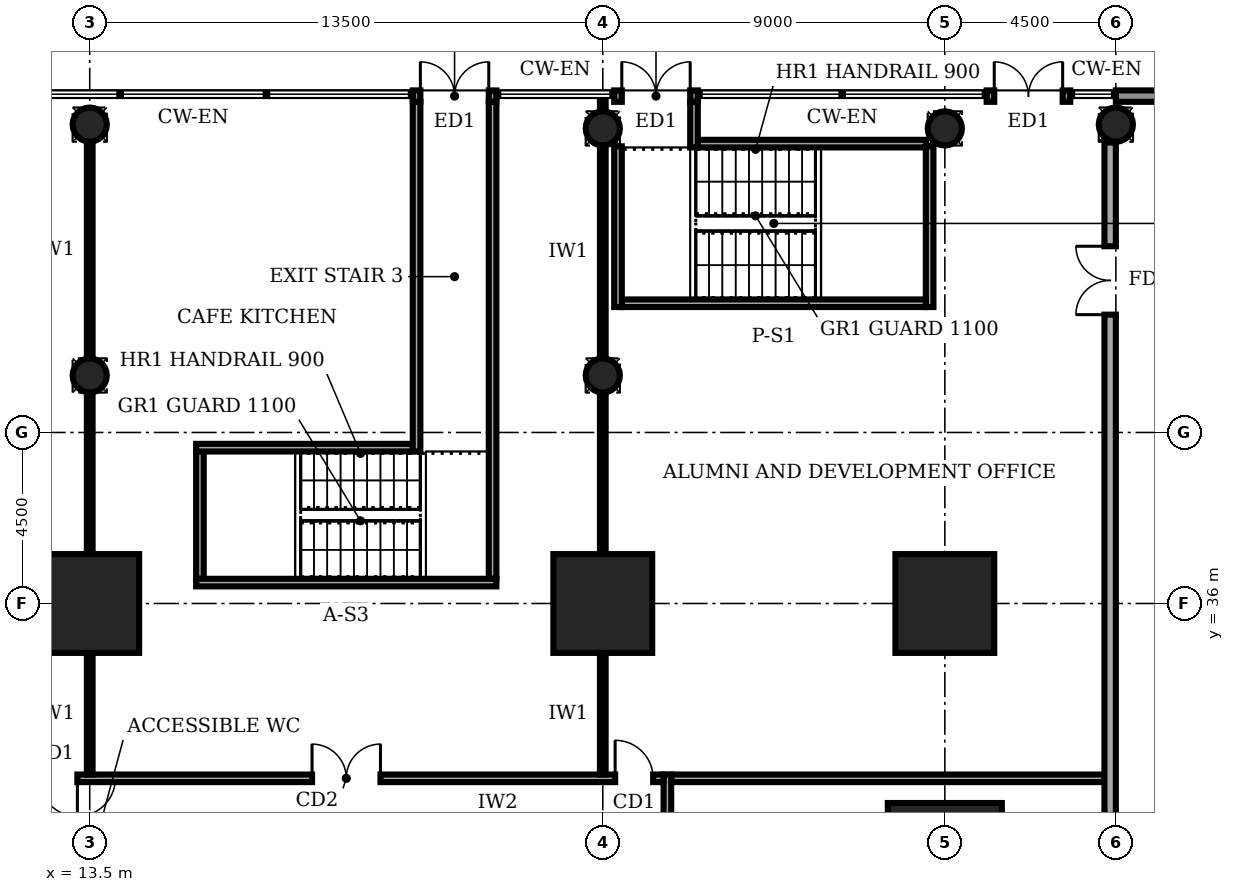
"""IFC4 building model, lengths in metres.
Left out: names, types, materials, properties, quantities, classifications, styles, units other than length and angle.
Written with IfcOpenShell. Run it as: python <this file> out.ifc"""

import sys

from ifc_helpers import new_model, si_unit, direction, frame, frame_2d, origin, origin_2d, place, context, subcontext, project, spatial, rectangle, circle, extrude, element, fill, save


model = new_model("IFC4")
c1 = context("Model", 3, precision=1e-05, world=origin(), true_north=direction((0.0, 1.0)))
c2 = subcontext(c1, "Body", "Model", "MODEL_VIEW")
j1 = project(units=[si_unit("LENGTHUNIT", "METRE"), si_unit("PLANEANGLEUNIT", "RADIAN")], contexts=[c1])
p1 = place(None, origin())
s1 = spatial("IfcSite", under=j1, at=p1, CompositionType="ELEMENT")
p2 = place(p1, origin())
s2 = spatial("IfcBuilding", under=s1, at=p2, CompositionType="ELEMENT")
p3 = place(p2, origin())
s3 = spatial("IfcBuildingStorey", under=s2, at=p3, CompositionType="ELEMENT", Elevation=0.0)
p4 = place(p3, frame((36.0, 29.25, -0.4), z_axis=(0.0, 0.0, 1.0), x_axis=(1.0, 0.0, 0.0)))
e1 = element("IfcColumn", 1, at=p4, inside=s3, PredefinedType="COLUMN", context=c2, shape_type="SweptSolid", body=[
    extrude(rectangle(XDim=3.0, YDim=3.0, at=origin_2d()), origin(), (0.0, 0.0, 1.0), 6.4),
])
for number, where, z_axis, x_axis in (
    (2, (13.5, 36.0, -0.4), (0.0, 0.0, 1.0), (1.0, 0.0, 0.0)),
    (3, (27.0, 36.0, -0.4), (0.0, 0.0, 1.0), (1.0, 0.0, 0.0)),
    (4, (36.0, 36.0, -0.4), (0.0, 0.0, 1.0), (1.0, 0.0, 0.0)),
):
    element("IfcColumn", number, at=place(p3, frame(where, z_axis=z_axis, x_axis=x_axis)), inside=s3, PredefinedType="COLUMN", context=c2, shape_type="SweptSolid", body=[
        extrude(rectangle(XDim=2.6, YDim=2.6, at=origin_2d()), origin(), (0.0, 0.0, 1.0), 6.4),
    ])
for number, where, z_axis, x_axis in (
    (5, (13.5, 42.0, -0.4), (0.0, 0.0, 1.0), (1.0, 0.0, 0.0)),
    (6, (27.0, 42.0, -0.4), (0.0, 0.0, 1.0), (1.0, 0.0, 0.0)),
    (7, (13.5, 48.6, -0.4), (0.0, 0.0, 1.0), (1.0, 0.0, 0.0)),
    (8, (27.0, 48.5, -0.4), (0.0, 0.0, 1.0), (1.0, 0.0, 0.0)),
    (9, (36.0, 48.5, -0.4), (0.0, 0.0, 1.0), (1.0, 0.0, 0.0)),
    (10, (40.5, 48.6, -0.4), (0.0, 0.0, 1.0), (1.0, 0.0, 0.0)),
):
    element("IfcColumn", number, at=place(p3, frame(where, z_axis=z_axis, x_axis=x_axis)), inside=s3, PredefinedType="COLUMN", context=c2, shape_type="SweptSolid", body=[
        extrude(circle(Radius=0.45, at=origin_2d()), origin(), (0.0, 0.0, 1.0), 6.4),
    ])
p5 = place(p3, frame((24.2, 49.35, 0.0), z_axis=(0.0, 0.0, 1.0), x_axis=(-1.0, 0.0, 0.0)))
e11 = element("IfcWall", 11, at=p5, inside=s3, PredefinedType="STANDARD", context=c2, shape_type="SweptSolid", body=[
    extrude(rectangle(XDim=2.2, YDim=0.3, at=frame_2d((1.1, 0.0))), origin(), (0.0, 0.0, 1.0), 5.7),
])
p6 = place(p5, frame((0.2, 0.0, 0.0)))
e12 = element("IfcOpeningElement", 12, at=p6, cuts=e11, PredefinedType="OPENING", context=c2, shape_type="SweptSolid", body=[
    extrude(rectangle(XDim=1.8, YDim=2.4, at=frame_2d((0.9, 1.2))), frame((0.0, 0.16, 0.0), z_axis=(0.0, -1.0, 0.0), x_axis=(1.0, 0.0, 0.0)), (0.0, 0.0, 1.0), 0.32),
])
p7 = place(p3, frame((29.5, 49.35, 0.0), z_axis=(0.0, 0.0, 1.0), x_axis=(-1.0, 0.0, 0.0)))
e13 = element("IfcWall", 13, at=p7, inside=s3, PredefinedType="STANDARD", context=c2, shape_type="SweptSolid", body=[
    extrude(rectangle(XDim=2.2, YDim=0.3, at=frame_2d((1.1, 0.0))), origin(), (0.0, 0.0, 1.0), 5.7),
])
p8 = place(p7, frame((0.2, 0.0, 0.0)))
e14 = element("IfcOpeningElement", 14, at=p8, cuts=e13, PredefinedType="OPENING", context=c2, shape_type="SweptSolid", body=[
    extrude(rectangle(XDim=1.8, YDim=2.4, at=frame_2d((0.9, 1.2))), frame((0.0, 0.16, 0.0), z_axis=(0.0, -1.0, 0.0), x_axis=(1.0, 0.0, 0.0)), (0.0, 0.0, 1.0), 0.32),
])
p9 = place(p3, frame((39.3, 49.35, 0.0), z_axis=(0.0, 0.0, 1.0), x_axis=(-1.0, 0.0, 0.0)))
e15 = element("IfcWall", 15, at=p9, inside=s3, PredefinedType="STANDARD", context=c2, shape_type="SweptSolid", body=[
    extrude(rectangle(XDim=2.2, YDim=0.3, at=frame_2d((1.1, 0.0))), origin(), (0.0, 0.0, 1.0), 5.7),
])
p10 = place(p9, frame((0.2, 0.0, 0.0)))
e16 = element("IfcOpeningElement", 16, at=p10, cuts=e15, PredefinedType="OPENING", context=c2, shape_type="SweptSolid", body=[
    extrude(rectangle(XDim=1.8, YDim=2.4, at=frame_2d((0.9, 1.2))), frame((0.0, 0.16, 0.0), z_axis=(0.0, -1.0, 0.0), x_axis=(1.0, 0.0, 0.0)), (0.0, 0.0, 1.0), 0.32),
])
p11 = place(p3, frame((63.0, 49.35, 0.0), z_axis=(0.0, 0.0, 1.0), x_axis=(-1.0, 0.0, 0.0)))
e17 = element("IfcWall", 17, at=p11, inside=s3, PredefinedType="STANDARD", context=c2, shape_type="SweptSolid", body=[
    extrude(rectangle(XDim=22.5, YDim=0.3, at=frame_2d((11.25, 0.0))), origin(), (0.0, 0.0, 1.0), 5.7),
])
p12 = place(p11, frame((17.1, 0.0, 0.0)))
e18 = element("IfcOpeningElement", 18, at=p12, cuts=e17, PredefinedType="OPENING", context=c2, shape_type="SweptSolid", body=[
    extrude(rectangle(XDim=1.8, YDim=2.4, at=frame_2d((0.9, 1.2))), frame((0.0, 0.16, 0.0), z_axis=(0.0, -1.0, 0.0), x_axis=(1.0, 0.0, 0.0)), (0.0, 0.0, 1.0), 0.32),
])
p13 = place(p11, frame((12.6, 0.0, 0.0)))
e19 = element("IfcOpeningElement", 19, at=p13, cuts=e17, PredefinedType="OPENING", context=c2, shape_type="SweptSolid", body=[
    extrude(rectangle(XDim=1.8, YDim=2.4, at=frame_2d((0.9, 1.2))), frame((0.0, 0.16, 0.0), z_axis=(0.0, -1.0, 0.0), x_axis=(1.0, 0.0, 0.0)), (0.0, 0.0, 1.0), 0.32),
])
p14 = place(p11, frame((2.5, 0.0, 0.0)))
e20 = element("IfcOpeningElement", 20, at=p14, cuts=e17, PredefinedType="OPENING", context=c2, shape_type="SweptSolid", body=[
    extrude(rectangle(XDim=1.8, YDim=2.4, at=frame_2d((0.9, 1.2))), frame((0.0, 0.16, 0.0), z_axis=(0.0, -1.0, 0.0), x_axis=(1.0, 0.0, 0.0)), (0.0, 0.0, 1.0), 0.32),
])
p15 = place(p3, frame((28.7, 9.2, 0.0), z_axis=(0.0, 0.0, 1.0), x_axis=(0.0, 1.0, 0.0)))
e21 = element("IfcWall", 21, at=p15, inside=s3, PredefinedType="SOLIDWALL", context=c2, shape_type="SweptSolid", body=[
    extrude(rectangle(XDim=22.3, YDim=0.2, at=frame_2d((11.15, 0.0))), origin(), (0.0, 0.0, 1.0), 5.7),
])
p16 = place(p15, frame((1.55, 0.0, 0.0)))
e22 = element("IfcOpeningElement", 22, at=p16, cuts=e21, PredefinedType="OPENING", context=c2, shape_type="SweptSolid", body=[
    extrude(rectangle(XDim=1.0, YDim=2.1, at=frame_2d((0.5, 1.05))), frame((0.0, 0.11, 0.0), z_axis=(0.0, -1.0, 0.0), x_axis=(1.0, 0.0, 0.0)), (0.0, 0.0, 1.0), 0.22),
])
p17 = place(p15, frame((10.15, 0.0, 0.0)))
e23 = element("IfcOpeningElement", 23, at=p17, cuts=e21, PredefinedType="OPENING", context=c2, shape_type="SweptSolid", body=[
    extrude(rectangle(XDim=1.8, YDim=2.1, at=frame_2d((0.9, 1.05))), frame((0.0, 0.11, 0.0), z_axis=(0.0, -1.0, 0.0), x_axis=(1.0, 0.0, 0.0)), (0.0, 0.0, 1.0), 0.22),
])
p18 = place(p15, frame((19.55, 0.0, 0.0)))
e24 = element("IfcOpeningElement", 24, at=p18, cuts=e21, PredefinedType="OPENING", context=c2, shape_type="SweptSolid", body=[
    extrude(rectangle(XDim=1.0, YDim=2.1, at=frame_2d((0.5, 1.05))), frame((0.0, 0.11, 0.0), z_axis=(0.0, -1.0, 0.0), x_axis=(1.0, 0.0, 0.0)), (0.0, 0.0, 1.0), 0.22),
])
p19 = place(p3, frame((28.6, 31.4, 0.0), z_axis=(0.0, 0.0, 1.0), x_axis=(-1.0, 0.0, 0.0)))
e25 = element("IfcWall", 25, at=p19, inside=s3, PredefinedType="SOLIDWALL", context=c2, shape_type="SweptSolid", body=[
    extrude(rectangle(XDim=16.9, YDim=0.2, at=frame_2d((8.45, 0.0))), origin(), (0.0, 0.0, 1.0), 5.7),
])
p20 = place(p19, frame((15.425, 0.0, 0.0)))
e26 = element("IfcOpeningElement", 26, at=p20, cuts=e25, PredefinedType="OPENING", context=c2, shape_type="SweptSolid", body=[
    extrude(rectangle(XDim=1.0, YDim=2.1, at=frame_2d((0.5, 1.05))), frame((0.0, 0.11, 0.0), z_axis=(0.0, -1.0, 0.0), x_axis=(1.0, 0.0, 0.0)), (0.0, 0.0, 1.0), 0.22),
])
p21 = place(p19, frame((7.45, 0.0, 0.0)))
e27 = element("IfcOpeningElement", 27, at=p21, cuts=e25, PredefinedType="OPENING", context=c2, shape_type="SweptSolid", body=[
    extrude(rectangle(XDim=1.8, YDim=2.1, at=frame_2d((0.9, 1.05))), frame((0.0, 0.11, 0.0), z_axis=(0.0, -1.0, 0.0), x_axis=(1.0, 0.0, 0.0)), (0.0, 0.0, 1.0), 0.22),
])
p22 = place(p19, frame((0.275, 0.0, 0.0)))
e28 = element("IfcOpeningElement", 28, at=p22, cuts=e25, PredefinedType="OPENING", context=c2, shape_type="SweptSolid", body=[
    extrude(rectangle(XDim=1.0, YDim=2.1, at=frame_2d((0.5, 1.05))), frame((0.0, 0.11, 0.0), z_axis=(0.0, -1.0, 0.0), x_axis=(1.0, 0.0, 0.0)), (0.0, 0.0, 1.0), 0.22),
])
p23 = place(p3, frame((28.8, 31.4, 0.0), z_axis=(0.0, 0.0, 1.0), x_axis=(1.0, 0.0, 0.0)))
e29 = element("IfcWall", 29, at=p23, inside=s3, PredefinedType="SOLIDWALL", context=c2, shape_type="SweptSolid", body=[
    extrude(rectangle(XDim=11.4, YDim=0.2, at=frame_2d((5.7, 0.0))), origin(), (0.0, 0.0, 1.0), 5.7),
])
p24 = place(p3, frame((13.5, 31.5, 0.0), z_axis=(0.0, 0.0, 1.0), x_axis=(0.0, 1.0, 0.0)))
e30 = element("IfcWall", 30, at=p24, inside=s3, PredefinedType="PARTITIONING", context=c2, shape_type="SweptSolid", body=[
    extrude(rectangle(XDim=3.18, YDim=0.15, at=frame_2d((1.59, 0.0))), origin(), (0.0, 0.0, 1.0), 4.8),
])
p25 = place(p3, frame((13.5, 37.32, 0.0), z_axis=(0.0, 0.0, 1.0), x_axis=(0.0, 1.0, 0.0)))
e31 = element("IfcWall", 31, at=p25, inside=s3, PredefinedType="PARTITIONING", context=c2, shape_type="SweptSolid", body=[
    extrude(rectangle(XDim=4.21, YDim=0.15, at=frame_2d((2.105, 0.0))), origin(), (0.0, 0.0, 1.0), 4.7),
])
p26 = place(p3, frame((13.5, 42.47, 0.0), z_axis=(0.0, 0.0, 1.0), x_axis=(0.0, 1.0, 0.0)))
e32 = element("IfcWall", 32, at=p26, inside=s3, PredefinedType="PARTITIONING", context=c2, shape_type="SweptSolid", body=[
    extrude(rectangle(XDim=5.66, YDim=0.15, at=frame_2d((2.83, 0.0))), origin(), (0.0, 0.0, 1.0), 4.7),
])
p27 = place(p3, frame((27.0, 31.5, 0.0), z_axis=(0.0, 0.0, 1.0), x_axis=(0.0, 1.0, 0.0)))
e33 = element("IfcWall", 33, at=p27, inside=s3, PredefinedType="PARTITIONING", context=c2, shape_type="SweptSolid", body=[
    extrude(rectangle(XDim=3.18, YDim=0.15, at=frame_2d((1.59, 0.0))), origin(), (0.0, 0.0, 1.0), 4.8),
])
p28 = place(p3, frame((27.0, 37.32, 0.0), z_axis=(0.0, 0.0, 1.0), x_axis=(0.0, 1.0, 0.0)))
e34 = element("IfcWall", 34, at=p28, inside=s3, PredefinedType="PARTITIONING", context=c2, shape_type="SweptSolid", body=[
    extrude(rectangle(XDim=4.21, YDim=0.15, at=frame_2d((2.105, 0.0))), origin(), (0.0, 0.0, 1.0), 4.7),
])
p29 = place(p3, frame((27.0, 42.47, 0.0), z_axis=(0.0, 0.0, 1.0), x_axis=(0.0, 1.0, 0.0)))
e35 = element("IfcWall", 35, at=p29, inside=s3, PredefinedType="PARTITIONING", context=c2, shape_type="SweptSolid", body=[
    extrude(rectangle(XDim=5.56, YDim=0.15, at=frame_2d((2.78, 0.0))), origin(), (0.0, 0.0, 1.0), 4.7),
])
p30 = place(p3, frame((27.0, 48.97, 0.0), z_axis=(0.0, 0.0, 1.0), x_axis=(0.0, 1.0, 0.0)))
e36 = element("IfcWall", 36, at=p30, inside=s3, PredefinedType="PARTITIONING", context=c2, shape_type="SweptSolid", body=[
    extrude(rectangle(XDim=0.35, YDim=0.15, at=frame_2d((0.175, 0.0))), origin(), (0.0, 0.0, 1.0), 5.7),
])
p31 = place(p3, frame((27.5, 43.9, 0.0), z_axis=(0.0, 0.0, 1.0), x_axis=(1.0, 0.0, 0.0)))
e37 = element("IfcWall", 37, at=p31, inside=s3, PredefinedType="SOLIDWALL", context=c2, shape_type="SweptSolid", body=[
    extrude(rectangle(XDim=8.0, YDim=0.2, at=frame_2d((4.0, 0.0))), origin(), (0.0, 0.0, 1.0), 5.7),
])
p32 = place(p3, frame((29.5, 48.1, 0.0), z_axis=(0.0, 0.0, 1.0), x_axis=(1.0, 0.0, 0.0)))
e38 = element("IfcWall", 38, at=p32, inside=s3, PredefinedType="SOLIDWALL", context=c2, shape_type="SweptSolid", body=[
    extrude(rectangle(XDim=6.0, YDim=0.2, at=frame_2d((3.0, 0.0))), origin(), (0.0, 0.0, 1.0), 5.7),
])
p33 = place(p3, frame((29.4, 48.0, 0.0), z_axis=(0.0, 0.0, 1.0), x_axis=(0.0, 1.0, 0.0)))
e39 = element("IfcWall", 39, at=p33, inside=s3, PredefinedType="SOLIDWALL", context=c2, shape_type="SweptSolid", body=[
    extrude(rectangle(XDim=1.2, YDim=0.2, at=frame_2d((0.6, 0.0))), origin(), (0.0, 0.0, 1.0), 5.7),
])
for number, where, z_axis, x_axis in (
    (40, (27.4, 43.8, 0.0), (0.0, 0.0, 1.0), (0.0, 1.0, 0.0)),
    (41, (35.6, 43.8, 0.0), (0.0, 0.0, 1.0), (0.0, 1.0, 0.0)),
):
    element("IfcWall", number, at=place(p3, frame(where, z_axis=z_axis, x_axis=x_axis)), inside=s3, PredefinedType="SOLIDWALL", context=c2, shape_type="SweptSolid", body=[
        extrude(rectangle(XDim=4.23, YDim=0.2, at=frame_2d((2.115, 0.0))), origin(), (0.0, 0.0, 1.0), 5.7),
    ])
p34 = place(p3, frame((16.3, 36.55, 0.0), z_axis=(0.0, 0.0, 1.0), x_axis=(1.0, 0.0, 0.0)))
e42 = element("IfcWall", 42, at=p34, inside=s3, PredefinedType="SOLIDWALL", context=c2, shape_type="SweptSolid", body=[
    extrude(rectangle(XDim=7.9, YDim=0.2, at=frame_2d((3.95, 0.0))), origin(), (0.0, 0.0, 1.0), 5.7),
])
p35 = place(p3, frame((16.3, 40.1, 0.0), z_axis=(0.0, 0.0, 1.0), x_axis=(1.0, 0.0, 0.0)))
e43 = element("IfcWall", 43, at=p35, inside=s3, PredefinedType="SOLIDWALL", context=c2, shape_type="SweptSolid", body=[
    extrude(rectangle(XDim=5.7, YDim=0.2, at=frame_2d((2.85, 0.0))), origin(), (0.0, 0.0, 1.0), 5.7),
])
p36 = place(p3, frame((16.4, 36.65, 0.0), z_axis=(0.0, 0.0, 1.0), x_axis=(0.0, 1.0, 0.0)))
e44 = element("IfcWall", 44, at=p36, inside=s3, PredefinedType="SOLIDWALL", context=c2, shape_type="SweptSolid", body=[
    extrude(rectangle(XDim=3.35, YDim=0.2, at=frame_2d((1.675, 0.0))), origin(), (0.0, 0.0, 1.0), 5.7),
])
p37 = place(p3, frame((24.1, 36.65, 0.0), z_axis=(0.0, 0.0, 1.0), x_axis=(0.0, 1.0, 0.0)))
e45 = element("IfcWall", 45, at=p37, inside=s3, PredefinedType="SOLIDWALL", context=c2, shape_type="SweptSolid", body=[
    extrude(rectangle(XDim=12.55, YDim=0.2, at=frame_2d((6.275, 0.0))), origin(), (0.0, 0.0, 1.0), 5.7),
])
p38 = place(p3, frame((22.1, 40.0, 0.0), z_axis=(0.0, 0.0, 1.0), x_axis=(0.0, 1.0, 0.0)))
e46 = element("IfcWall", 46, at=p38, inside=s3, PredefinedType="SOLIDWALL", context=c2, shape_type="SweptSolid", body=[
    extrude(rectangle(XDim=9.2, YDim=0.2, at=frame_2d((4.6, 0.0))), origin(), (0.0, 0.0, 1.0), 5.7),
])
p39 = place(p3, frame((40.35, 4.97, 0.0), z_axis=(0.0, 0.0, 1.0), x_axis=(0.0, 1.0, 0.0)))
e47 = element("IfcWall", 47, at=p39, inside=s3, PredefinedType="SOLIDWALL", context=c2, shape_type="SweptSolid", body=[
    extrude(rectangle(XDim=43.16, YDim=0.3, at=frame_2d((21.58, 0.0))), origin(), (0.0, 0.0, 1.0), 5.7),
])
p40 = place(p39, frame((9.88, 0.0, 0.0)))
e48 = element("IfcOpeningElement", 48, at=p40, cuts=e47, PredefinedType="OPENING", context=c2, shape_type="SweptSolid", body=[
    extrude(rectangle(XDim=1.8, YDim=2.1, at=frame_2d((0.9, 1.05))), frame((0.0, 0.16, 0.0), z_axis=(0.0, -1.0, 0.0), x_axis=(1.0, 0.0, 0.0)), (0.0, 0.0, 1.0), 0.32),
])
p41 = place(p39, frame((38.63, 0.0, 0.0)))
e49 = element("IfcOpeningElement", 49, at=p41, cuts=e47, PredefinedType="OPENING", context=c2, shape_type="SweptSolid", body=[
    extrude(rectangle(XDim=1.8, YDim=2.1, at=frame_2d((0.9, 1.05))), frame((0.0, 0.16, 0.0), z_axis=(0.0, -1.0, 0.0), x_axis=(1.0, 0.0, 0.0)), (0.0, 0.0, 1.0), 0.32),
])
p42 = place(p6, frame((1.8, 0.0, 0.0), z_axis=(0.0, 0.0, 1.0), x_axis=(-1.0, 0.0, 0.0)))
e50 = element("IfcDoor", 50, at=p42, inside=s3, OperationType="DOUBLE_DOOR_SINGLE_SWING", PredefinedType="DOOR", context=c2, shape_type="SweptSolid", body=[
    extrude(rectangle(XDim=1.8, YDim=2.4, at=frame_2d((0.9, 1.2))), frame((0.0, 0.025, 0.0), z_axis=(0.0, -1.0, 0.0), x_axis=(1.0, 0.0, 0.0)), (0.0, 0.0, 1.0), 0.05),
])
fill(e12, e50)
p43 = place(p8, frame((1.8, 0.0, 0.0), z_axis=(0.0, 0.0, 1.0), x_axis=(-1.0, 0.0, 0.0)))
e51 = element("IfcDoor", 51, at=p43, inside=s3, OperationType="DOUBLE_DOOR_SINGLE_SWING", PredefinedType="DOOR", context=c2, shape_type="SweptSolid", body=[
    extrude(rectangle(XDim=1.8, YDim=2.4, at=frame_2d((0.9, 1.2))), frame((0.0, 0.025, 0.0), z_axis=(0.0, -1.0, 0.0), x_axis=(1.0, 0.0, 0.0)), (0.0, 0.0, 1.0), 0.05),
])
fill(e14, e51)
p44 = place(p10, frame((1.8, 0.0, 0.0), z_axis=(0.0, 0.0, 1.0), x_axis=(-1.0, 0.0, 0.0)))
e52 = element("IfcDoor", 52, at=p44, inside=s3, OperationType="DOUBLE_DOOR_SINGLE_SWING", PredefinedType="DOOR", context=c2, shape_type="SweptSolid", body=[
    extrude(rectangle(XDim=1.8, YDim=2.4, at=frame_2d((0.9, 1.2))), frame((0.0, 0.025, 0.0), z_axis=(0.0, -1.0, 0.0), x_axis=(1.0, 0.0, 0.0)), (0.0, 0.0, 1.0), 0.05),
])
fill(e16, e52)
p45 = place(p20, origin())
e53 = element("IfcDoor", 53, at=p45, inside=s3, OperationType="SINGLE_SWING_LEFT", PredefinedType="DOOR", context=c2, shape_type="SweptSolid", body=[
    extrude(rectangle(XDim=1.0, YDim=2.1, at=frame_2d((0.5, 1.05))), frame((0.0, 0.025, 0.0), z_axis=(0.0, -1.0, 0.0), x_axis=(1.0, 0.0, 0.0)), (0.0, 0.0, 1.0), 0.05),
])
fill(e26, e53)
p46 = place(p21, frame((1.8, 0.0, 0.0), z_axis=(0.0, 0.0, 1.0), x_axis=(-1.0, 0.0, 0.0)))
e54 = element("IfcDoor", 54, at=p46, inside=s3, OperationType="DOUBLE_DOOR_SINGLE_SWING", PredefinedType="DOOR", context=c2, shape_type="SweptSolid", body=[
    extrude(rectangle(XDim=1.8, YDim=2.1, at=frame_2d((0.9, 1.05))), frame((0.0, 0.025, 0.0), z_axis=(0.0, -1.0, 0.0), x_axis=(1.0, 0.0, 0.0)), (0.0, 0.0, 1.0), 0.05),
])
fill(e27, e54)
p47 = place(p22, frame((1.0, 0.0, 0.0), z_axis=(0.0, 0.0, 1.0), x_axis=(-1.0, 0.0, 0.0)))
e55 = element("IfcDoor", 55, at=p47, inside=s3, OperationType="SINGLE_SWING_LEFT", PredefinedType="DOOR", context=c2, shape_type="SweptSolid", body=[
    extrude(rectangle(XDim=1.0, YDim=2.1, at=frame_2d((0.5, 1.05))), frame((0.0, 0.025, 0.0), z_axis=(0.0, -1.0, 0.0), x_axis=(1.0, 0.0, 0.0)), (0.0, 0.0, 1.0), 0.05),
])
fill(e28, e55)
p48 = place(p41, origin())
e56 = element("IfcDoor", 56, at=p48, inside=s3, OperationType="DOUBLE_DOOR_SINGLE_SWING", PredefinedType="DOOR", context=c2, shape_type="SweptSolid", body=[
    extrude(rectangle(XDim=1.8, YDim=2.1, at=frame_2d((0.9, 1.05))), frame((0.0, 0.025, 0.0), z_axis=(0.0, -1.0, 0.0), x_axis=(1.0, 0.0, 0.0)), (0.0, 0.0, 1.0), 0.05),
])
fill(e49, e56)
save(model, sys.argv[1])
